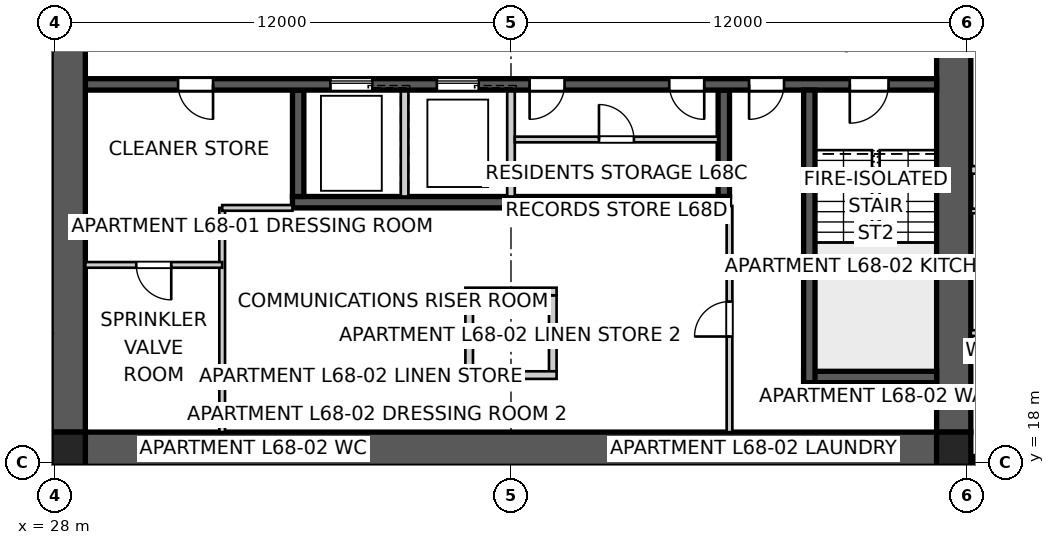
"""IFC4 building model, lengths in metres.
Left out: names, types, materials, properties, quantities, classifications, styles, units other than length and angle.
Written with IfcOpenShell. Run it as: python <this file> out.ifc"""

import sys

from ifc_helpers import new_model, si_unit, direction, frame, frame_2d, origin, origin_2d, place, context, subcontext, project, spatial, polyline, rectangle, outline, extrude, element, fill, save


model = new_model("IFC4")
c1 = context("Model", 3, precision=1e-05, world=origin(), true_north=direction((0.0, 1.0)))
c2 = subcontext(c1, "Body", "Model", "MODEL_VIEW")
j1 = project(units=[si_unit("LENGTHUNIT", "METRE"), si_unit("PLANEANGLEUNIT", "RADIAN")], contexts=[c1])
p1 = place(None, origin())
s1 = spatial("IfcSite", under=j1, at=p1, CompositionType="ELEMENT")
p2 = place(p1, origin())
s2 = spatial("IfcBuilding", under=s1, at=p2, CompositionType="ELEMENT")
p3 = place(p2, frame((0.0, 0.0, 247.2)))
s3 = spatial("IfcBuildingStorey", under=s2, at=p3, CompositionType="ELEMENT", Elevation=247.2)
p4 = place(p3, frame((51.2, 18.35, 0.0), z_axis=(0.0, 0.0, 1.0), x_axis=(-1.0, 0.0, 0.0)))
e1 = element("IfcWall", 1, at=p4, inside=s3, PredefinedType="SHEAR", context=c2, shape_type="SweptSolid", body=[
    extrude(outline(polyline([(0.0, -0.45), (22.4, -0.45), (22.4, -0.025), (22.85, -0.025), (22.85, 0.025), (22.4, 0.025), (22.4, 0.45), (0.0, 0.45), (0.0, 0.025), (-0.45, 0.025), (-0.45, -0.025), (0.0, -0.025), (0.0, -0.45)])), origin(), (0.0, 0.0, 1.0), 3.4),
])
p5 = place(p3, frame((51.65, 18.8, 0.0), z_axis=(0.0, 0.0, 1.0), x_axis=(0.0, 1.0, 0.0)))
e2 = element("IfcWall", 2, at=p5, inside=s3, PredefinedType="SHEAR", context=c2, shape_type="SweptSolid", body=[
    extrude(outline(polyline([(0.0, -0.45), (22.4, -0.45), (22.4, -0.025), (22.85, -0.025), (22.85, 0.025), (22.4, 0.025), (22.4, 0.45), (0.0, 0.45), (0.0, 0.025), (-0.45, 0.025), (-0.45, -0.025), (0.0, -0.025), (0.0, -0.45)])), origin(), (0.0, 0.0, 1.0), 3.4),
])
p6 = place(p5, frame((11.14, 0.0, 0.0)))
e3 = element("IfcOpeningElement", 3, at=p6, cuts=e2, PredefinedType="OPENING", context=c2, shape_type="SweptSolid", body=[
    extrude(rectangle(XDim=1.02, YDim=2.4, at=frame_2d((0.51, 1.2))), frame((0.0, 0.46, 0.0), z_axis=(0.0, -1.0, 0.0), x_axis=(1.0, 0.0, 0.0)), (0.0, 0.0, 1.0), 0.92),
])
p7 = place(p3, frame((28.35, 41.2, 0.0), z_axis=(0.0, 0.0, 1.0), x_axis=(0.0, -1.0, 0.0)))
e4 = element("IfcWall", 4, at=p7, inside=s3, PredefinedType="SHEAR", context=c2, shape_type="SweptSolid", body=[
    extrude(outline(polyline([(0.0, -0.45), (22.4, -0.45), (22.4, -0.025), (22.85, -0.025), (22.85, 0.025), (22.4, 0.025), (22.4, 0.45), (0.0, 0.45), (0.0, 0.025), (-0.45, 0.025), (-0.45, -0.025), (0.0, -0.025), (0.0, -0.45)])), origin(), (0.0, 0.0, 1.0), 3.4),
])
p8 = place(p7, frame((11.14, 0.0, 0.0)))
e5 = element("IfcOpeningElement", 5, at=p8, cuts=e4, PredefinedType="OPENING", context=c2, shape_type="SweptSolid", body=[
    extrude(rectangle(XDim=1.02, YDim=2.4, at=frame_2d((0.51, 1.2))), frame((0.0, 0.46, 0.0), z_axis=(0.0, -1.0, 0.0), x_axis=(1.0, 0.0, 0.0)), (0.0, 0.0, 1.0), 0.92),
])
p9 = place(p3, frame((51.2, 27.95, 0.0), z_axis=(0.0, 0.0, 1.0), x_axis=(-1.0, 0.0, 0.0)))
e6 = element("IfcWall", 6, at=p9, inside=s3, PredefinedType="SHEAR", context=c2, shape_type="SweptSolid", body=[
    extrude(rectangle(XDim=22.4, YDim=0.3, at=frame_2d((11.2, 0.0))), origin(), (0.0, 0.0, 1.0), 3.4),
])
p10 = place(p9, frame((19.04, 0.0, 0.0)))
e7 = element("IfcOpeningElement", 7, at=p10, cuts=e6, PredefinedType="OPENING", context=c2, shape_type="SweptSolid", body=[
    extrude(rectangle(XDim=0.92, YDim=2.1, at=frame_2d((0.46, 1.05))), frame((0.0, 0.16, 0.0), z_axis=(0.0, -1.0, 0.0), x_axis=(1.0, 0.0, 0.0)), (0.0, 0.0, 1.0), 0.32),
])
p11 = place(p9, frame((1.265, 0.0, 0.0)))
e8 = element("IfcOpeningElement", 8, at=p11, cuts=e6, PredefinedType="OPENING", context=c2, shape_type="SweptSolid", body=[
    extrude(rectangle(XDim=1.02, YDim=2.1, at=frame_2d((0.51, 1.05))), frame((0.0, 0.16, 0.0), z_axis=(0.0, -1.0, 0.0), x_axis=(1.0, 0.0, 0.0)), (0.0, 0.0, 1.0), 0.32),
])
p12 = place(p9, frame((4.015, 0.0, 0.0)))
e9 = element("IfcOpeningElement", 9, at=p12, cuts=e6, PredefinedType="OPENING", context=c2, shape_type="SweptSolid", body=[
    extrude(rectangle(XDim=0.92, YDim=2.1, at=frame_2d((0.46, 1.05))), frame((0.0, 0.16, 0.0), z_axis=(0.0, -1.0, 0.0), x_axis=(1.0, 0.0, 0.0)), (0.0, 0.0, 1.0), 0.32),
])
p13 = place(p9, frame((9.79, 0.0, 0.0)))
e10 = element("IfcOpeningElement", 10, at=p13, cuts=e6, PredefinedType="OPENING", context=c2, shape_type="SweptSolid", body=[
    extrude(rectangle(XDim=0.92, YDim=2.1, at=frame_2d((0.46, 1.05))), frame((0.0, 0.16, 0.0), z_axis=(0.0, -1.0, 0.0), x_axis=(1.0, 0.0, 0.0)), (0.0, 0.0, 1.0), 0.32),
])
p14 = place(p9, frame((6.115, 0.0, 0.0)))
e11 = element("IfcOpeningElement", 11, at=p14, cuts=e6, PredefinedType="OPENING", context=c2, shape_type="SweptSolid", body=[
    extrude(rectangle(XDim=0.92, YDim=2.1, at=frame_2d((0.46, 1.05))), frame((0.0, 0.16, 0.0), z_axis=(0.0, -1.0, 0.0), x_axis=(1.0, 0.0, 0.0)), (0.0, 0.0, 1.0), 0.32),
])
p15 = place(p9, frame((12.05, 0.0, 0.0)))
e12 = element("IfcOpeningElement", 12, at=p15, cuts=e6, PredefinedType="OPENING", context=c2, shape_type="SweptSolid", body=[
    extrude(rectangle(XDim=1.1, YDim=2.1, at=frame_2d((0.55, 1.05))), frame((0.0, 0.16, 0.0), z_axis=(0.0, -1.0, 0.0), x_axis=(1.0, 0.0, 0.0)), (0.0, 0.0, 1.0), 0.32),
])
p16 = place(p9, frame((14.85, 0.0, 0.0)))
e13 = element("IfcOpeningElement", 13, at=p16, cuts=e6, PredefinedType="OPENING", context=c2, shape_type="SweptSolid", body=[
    extrude(rectangle(XDim=1.1, YDim=2.1, at=frame_2d((0.55, 1.05))), frame((0.0, 0.16, 0.0), z_axis=(0.0, -1.0, 0.0), x_axis=(1.0, 0.0, 0.0)), (0.0, 0.0, 1.0), 0.32),
])
p17 = place(p3, frame((45.75, 24.85, 0.0), z_axis=(0.0, 0.0, 1.0), x_axis=(-1.0, 0.0, 0.0)))
e14 = element("IfcWall", 14, at=p17, inside=s3, PredefinedType="SHEAR", context=c2, shape_type="SweptSolid", body=[
    extrude(rectangle(XDim=11.5, YDim=0.3, at=frame_2d((5.75, 0.0))), origin(), (0.0, 0.0, 1.0), 3.4),
])
p18 = place(p3, frame((45.6, 27.8, 0.0), z_axis=(0.0, 0.0, 1.0), x_axis=(0.0, -1.0, 0.0)))
e15 = element("IfcWall", 15, at=p18, inside=s3, PredefinedType="SHEAR", context=c2, shape_type="SweptSolid", body=[
    extrude(rectangle(XDim=2.8, YDim=0.3, at=frame_2d((1.4, 0.0))), origin(), (0.0, 0.0, 1.0), 3.4),
])
for number, where, z_axis, x_axis in (
    (16, (40.0, 27.8, 0.0), (0.0, 0.0, 1.0), (0.0, -1.0, 0.0)),
    (17, (37.2, 27.8, 0.0), (0.0, 0.0, 1.0), (0.0, -1.0, 0.0)),
):
    element("IfcWall", number, at=place(p3, frame(where, z_axis=z_axis, x_axis=x_axis)), inside=s3, PredefinedType="SOLIDWALL", context=c2, shape_type="SweptSolid", body=[
        extrude(rectangle(XDim=2.8, YDim=0.2, at=frame_2d((1.4, 0.0))), origin(), (0.0, 0.0, 1.0), 3.4),
    ])
p19 = place(p3, frame((34.4, 27.8, 0.0), z_axis=(0.0, 0.0, 1.0), x_axis=(0.0, -1.0, 0.0)))
e18 = element("IfcWall", 18, at=p19, inside=s3, PredefinedType="SHEAR", context=c2, shape_type="SweptSolid", body=[
    extrude(rectangle(XDim=2.8, YDim=0.3, at=frame_2d((1.4, 0.0))), origin(), (0.0, 0.0, 1.0), 3.4),
])
p20 = place(p3, frame((47.85, 27.8, 0.0), z_axis=(0.0, 0.0, 1.0), x_axis=(0.0, -1.0, 0.0)))
e19 = element("IfcWall", 19, at=p20, inside=s3, PredefinedType="SHEAR", context=c2, shape_type="SweptSolid", body=[
    extrude(rectangle(XDim=7.7, YDim=0.3, at=frame_2d((3.85, 0.0))), origin(), (0.0, 0.0, 1.0), 3.4),
])
p21 = place(p3, frame((51.2, 20.25, 0.0), z_axis=(0.0, 0.0, 1.0), x_axis=(-1.0, 0.0, 0.0)))
e20 = element("IfcWall", 20, at=p21, inside=s3, PredefinedType="SHEAR", context=c2, shape_type="SweptSolid", body=[
    extrude(rectangle(XDim=3.5, YDim=0.3, at=frame_2d((1.75, 0.0))), origin(), (0.0, 0.0, 1.0), 3.4),
])
for number, where, z_axis, x_axis in (
    (21, (38.9, 22.4, 0.0), (0.0, 0.0, 1.0), (0.0, -1.0, 0.0)),
    (22, (41.1, 22.4, 0.0), (0.0, 0.0, 1.0), (0.0, -1.0, 0.0)),
):
    element("IfcWall", number, at=place(p3, frame(where, z_axis=z_axis, x_axis=x_axis)), inside=s3, PredefinedType="SOLIDWALL", context=c2, shape_type="SweptSolid", body=[
        extrude(rectangle(XDim=2.0, YDim=0.2, at=frame_2d((1.0, 0.0))), origin(), (0.0, 0.0, 1.0), 3.4),
    ])
for number, where, z_axis, x_axis in (
    (23, (38.8, 22.5, 0.0), (0.0, 0.0, 1.0), (1.0, 0.0, 0.0)),
    (24, (38.8, 20.3, 0.0), (0.0, 0.0, 1.0), (1.0, 0.0, 0.0)),
):
    element("IfcWall", number, at=place(p3, frame(where, z_axis=z_axis, x_axis=x_axis)), inside=s3, PredefinedType="SOLIDWALL", context=c2, shape_type="SweptSolid", body=[
        extrude(rectangle(XDim=2.4, YDim=0.2, at=frame_2d((1.2, 0.0))), origin(), (0.0, 0.0, 1.0), 3.4),
    ])
for number, where, z_axis, x_axis in (
    (25, (28.35, 18.35, 0.0), (0.0, 0.0, 1.0), (1.0, 0.0, 0.0)),
    (26, (51.65, 18.35, 0.0), (0.0, 0.0, 1.0), (1.0, 0.0, 0.0)),
):
    element("IfcColumn", number, at=place(p3, frame(where, z_axis=z_axis, x_axis=x_axis)), inside=s3, PredefinedType="COLUMN", context=c2, shape_type="SweptSolid", body=[
        extrude(rectangle(XDim=0.9, YDim=0.9, at=origin_2d()), origin(), (0.0, 0.0, 1.0), 3.4),
    ])
p22 = place(p3, frame((52.1, 25.7, 0.0), z_axis=(0.0, 0.0, 1.0), x_axis=(1.0, 0.0, 0.0)))
e27 = element("IfcWall", 27, at=p22, inside=s3, PredefinedType="PARTITIONING", context=c2, shape_type="SweptSolid", body=[
    extrude(rectangle(XDim=2.5, YDim=0.2, at=frame_2d((1.25, 0.0))), origin(), (0.0, 0.0, 1.0), 3.25),
])
p23 = place(p3, frame((22.388, 17.668, 0.0), z_axis=(0.0, 0.0, 1.0), x_axis=(0.819161528122, 0.573562891796, 0.0)))
e28 = element("IfcWall", 28, at=p23, inside=s3, PredefinedType="PARTITIONING", context=c2, shape_type="SweptSolid", body=[
    extrude(rectangle(XDim=6.681, YDim=0.25, at=frame_2d((3.341, 0.0))), origin(), (0.0, 0.0, 1.0), 3.25),
])
p24 = place(p3, frame((45.75, 18.8, 0.0), z_axis=(0.0, 0.0, 1.0), x_axis=(0.0, 1.0, 0.0)))
e29 = element("IfcWall", 29, at=p24, inside=s3, PredefinedType="SOLIDWALL", context=c2, shape_type="SweptSolid", body=[
    extrude(rectangle(XDim=5.95, YDim=0.15, at=frame_2d((2.975, 0.0))), origin(), (0.0, 0.0, 1.0), 3.25),
])
p25 = place(p24, frame((2.515, 0.0, 0.0)))
e30 = element("IfcOpeningElement", 30, at=p25, cuts=e29, PredefinedType="OPENING", context=c2, shape_type="SweptSolid", body=[
    extrude(rectangle(XDim=0.92, YDim=2.1, at=frame_2d((0.46, 1.05))), frame((0.0, 0.085, 0.0), z_axis=(0.0, -1.0, 0.0), x_axis=(1.0, 0.0, 0.0)), (0.0, 0.0, 1.0), 0.17),
])
p26 = place(p3, frame((32.4, 18.8, 0.0), z_axis=(0.0, 0.0, 1.0), x_axis=(0.0, 1.0, 0.0)))
e31 = element("IfcWall", 31, at=p26, inside=s3, PredefinedType="SOLIDWALL", context=c2, shape_type="SweptSolid", body=[
    extrude(rectangle(XDim=5.9, YDim=0.15, at=frame_2d((2.95, 0.0))), origin(), (0.0, 0.0, 1.0), 3.25),
])
p27 = place(p3, frame((32.4, 24.7, 0.0), z_axis=(0.0, 0.0, 1.0), x_axis=(1.0, 0.0, 0.0)))
e32 = element("IfcWall", 32, at=p27, inside=s3, PredefinedType="SOLIDWALL", context=c2, shape_type="SweptSolid", body=[
    extrude(rectangle(XDim=1.85, YDim=0.15, at=frame_2d((0.925, 0.0))), origin(), (0.0, 0.0, 1.0), 3.25),
])
p28 = place(p3, frame((32.4, 23.2, 0.0), z_axis=(0.0, 0.0, 1.0), x_axis=(-1.0, 0.0, 0.0)))
e33 = element("IfcWall", 33, at=p28, inside=s3, PredefinedType="SOLIDWALL", context=c2, shape_type="SweptSolid", body=[
    extrude(rectangle(XDim=3.6, YDim=0.15, at=frame_2d((1.8, 0.0))), origin(), (0.0, 0.0, 1.0), 3.25),
])
p29 = place(p28, frame((1.34, 0.0, 0.0)))
e34 = element("IfcOpeningElement", 34, at=p29, cuts=e33, PredefinedType="OPENING", context=c2, shape_type="SweptSolid", body=[
    extrude(rectangle(XDim=0.92, YDim=2.1, at=frame_2d((0.46, 1.05))), frame((0.0, 0.085, 0.0), z_axis=(0.0, -1.0, 0.0), x_axis=(1.0, 0.0, 0.0)), (0.0, 0.0, 1.0), 0.17),
])
p30 = place(p3, frame((57.0, 24.618, 0.0), z_axis=(0.0, 0.0, 1.0), x_axis=(-1.0, 0.0, 0.0)))
e35 = element("IfcWall", 35, at=p30, inside=s3, PredefinedType="PARTITIONING", context=c2, shape_type="SweptSolid", body=[
    extrude(rectangle(XDim=4.9, YDim=0.12, at=frame_2d((2.45, 0.0))), origin(), (0.0, 0.0, 1.0), 3.25),
])
p31 = place(p30, frame((1.99, 0.0, 0.0)))
e36 = element("IfcOpeningElement", 36, at=p31, cuts=e35, PredefinedType="OPENING", context=c2, shape_type="SweptSolid", body=[
    extrude(rectangle(XDim=0.92, YDim=2.34, at=frame_2d((0.46, 1.17))), frame((0.0, 0.07, 0.0), z_axis=(0.0, -1.0, 0.0), x_axis=(1.0, 0.0, 0.0)), (0.0, 0.0, 1.0), 0.14),
])
p32 = place(p3, frame((52.109, 18.194, 0.0), z_axis=(0.0, 0.0, 1.0), x_axis=(0.0, -1.0, 0.0)))
e37 = element("IfcWall", 37, at=p32, inside=s3, PredefinedType="SOLIDWALL", context=c2, shape_type="SweptSolid", body=[
    extrude(rectangle(XDim=5.194, YDim=0.15, at=frame_2d((2.597, 0.0))), origin(), (0.0, 0.0, 1.0), 3.25),
])
p33 = place(p32, frame((2.337, 0.0, 0.0)))
e38 = element("IfcOpeningElement", 38, at=p33, cuts=e37, PredefinedType="OPENING", context=c2, shape_type="SweptSolid", body=[
    extrude(rectangle(XDim=0.92, YDim=2.34, at=frame_2d((0.46, 1.17))), frame((0.0, 0.085, 0.0), z_axis=(0.0, -1.0, 0.0), x_axis=(1.0, 0.0, 0.0)), (0.0, 0.0, 1.0), 0.17),
])
p34 = place(p3, frame((57.0, 21.406, 0.0), z_axis=(0.0, 0.0, 1.0), x_axis=(-1.0, 0.0, 0.0)))
e39 = element("IfcWall", 39, at=p34, inside=s3, PredefinedType="SOLIDWALL", context=c2, shape_type="SweptSolid", body=[
    extrude(rectangle(XDim=4.9, YDim=0.15, at=frame_2d((2.45, 0.0))), origin(), (0.0, 0.0, 1.0), 3.25),
])
p35 = place(p34, frame((1.99, 0.0, 0.0)))
e40 = element("IfcOpeningElement", 40, at=p35, cuts=e39, PredefinedType="OPENING", context=c2, shape_type="SweptSolid", body=[
    extrude(rectangle(XDim=0.92, YDim=2.34, at=frame_2d((0.46, 1.17))), frame((0.0, 0.085, 0.0), z_axis=(0.0, -1.0, 0.0), x_axis=(1.0, 0.0, 0.0)), (0.0, 0.0, 1.0), 0.17),
])
p36 = place(p3, frame((40.1, 26.5, 0.0), z_axis=(0.0, 0.0, 1.0), x_axis=(1.0, 0.0, 0.0)))
e41 = element("IfcWall", 41, at=p36, inside=s3, PredefinedType="SOLIDWALL", context=c2, shape_type="SweptSolid", body=[
    extrude(rectangle(XDim=5.35, YDim=0.15, at=frame_2d((2.675, 0.0))), origin(), (0.0, 0.0, 1.0), 3.25),
])
p37 = place(p36, frame((2.215, 0.0, 0.0)))
e42 = element("IfcOpeningElement", 42, at=p37, cuts=e41, PredefinedType="OPENING", context=c2, shape_type="SweptSolid", body=[
    extrude(rectangle(XDim=0.92, YDim=2.1, at=frame_2d((0.46, 1.05))), frame((0.0, 0.085, 0.0), z_axis=(0.0, -1.0, 0.0), x_axis=(1.0, 0.0, 0.0)), (0.0, 0.0, 1.0), 0.17),
])
p38 = place(p10, origin())
e43 = element("IfcDoor", 43, at=p38, inside=s3, OperationType="SINGLE_SWING_LEFT", PredefinedType="DOOR", context=c2, shape_type="SweptSolid", body=[
    extrude(rectangle(XDim=0.92, YDim=2.1, at=frame_2d((0.46, 1.05))), frame((0.0, 0.025, 0.0), z_axis=(0.0, -1.0, 0.0), x_axis=(1.0, 0.0, 0.0)), (0.0, 0.0, 1.0), 0.05),
])
fill(e7, e43)
p39 = place(p11, origin())
e44 = element("IfcDoor", 44, at=p39, inside=s3, OperationType="SINGLE_SWING_RIGHT", PredefinedType="DOOR", context=c2, shape_type="SweptSolid", body=[
    extrude(rectangle(XDim=1.02, YDim=2.1, at=frame_2d((0.51, 1.05))), frame((0.0, 0.025, 0.0), z_axis=(0.0, -1.0, 0.0), x_axis=(1.0, 0.0, 0.0)), (0.0, 0.0, 1.0), 0.05),
])
fill(e8, e44)
p40 = place(p12, origin())
e45 = element("IfcDoor", 45, at=p40, inside=s3, OperationType="SINGLE_SWING_RIGHT", PredefinedType="DOOR", context=c2, shape_type="SweptSolid", body=[
    extrude(rectangle(XDim=0.92, YDim=2.1, at=frame_2d((0.46, 1.05))), frame((0.0, 0.025, 0.0), z_axis=(0.0, -1.0, 0.0), x_axis=(1.0, 0.0, 0.0)), (0.0, 0.0, 1.0), 0.05),
])
fill(e9, e45)
p41 = place(p29, origin())
e46 = element("IfcDoor", 46, at=p41, inside=s3, OperationType="SINGLE_SWING_LEFT", PredefinedType="DOOR", context=c2, shape_type="SweptSolid", body=[
    extrude(rectangle(XDim=0.92, YDim=2.1, at=frame_2d((0.46, 1.05))), frame((0.0, 0.025, 0.0), z_axis=(0.0, -1.0, 0.0), x_axis=(1.0, 0.0, 0.0)), (0.0, 0.0, 1.0), 0.05),
])
fill(e34, e46)
p42 = place(p25, origin())
e47 = element("IfcDoor", 47, at=p42, inside=s3, OperationType="SINGLE_SWING_LEFT", PredefinedType="DOOR", context=c2, shape_type="SweptSolid", body=[
    extrude(rectangle(XDim=0.92, YDim=2.1, at=frame_2d((0.46, 1.05))), frame((0.0, 0.025, 0.0), z_axis=(0.0, -1.0, 0.0), x_axis=(1.0, 0.0, 0.0)), (0.0, 0.0, 1.0), 0.05),
])
fill(e30, e47)
p43 = place(p13, origin())
e48 = element("IfcDoor", 48, at=p43, inside=s3, OperationType="SINGLE_SWING_RIGHT", PredefinedType="DOOR", context=c2, shape_type="SweptSolid", body=[
    extrude(rectangle(XDim=0.92, YDim=2.1, at=frame_2d((0.46, 1.05))), frame((0.0, 0.025, 0.0), z_axis=(0.0, -1.0, 0.0), x_axis=(1.0, 0.0, 0.0)), (0.0, 0.0, 1.0), 0.05),
])
fill(e10, e48)
p44 = place(p14, origin())
e49 = element("IfcDoor", 49, at=p44, inside=s3, OperationType="SINGLE_SWING_LEFT", PredefinedType="DOOR", context=c2, shape_type="SweptSolid", body=[
    extrude(rectangle(XDim=0.92, YDim=2.1, at=frame_2d((0.46, 1.05))), frame((0.0, 0.025, 0.0), z_axis=(0.0, -1.0, 0.0), x_axis=(1.0, 0.0, 0.0)), (0.0, 0.0, 1.0), 0.05),
])
fill(e11, e49)
p45 = place(p37, origin())
e50 = element("IfcDoor", 50, at=p45, inside=s3, OperationType="SINGLE_SWING_LEFT", PredefinedType="DOOR", context=c2, shape_type="SweptSolid", body=[
    extrude(rectangle(XDim=0.92, YDim=2.1, at=frame_2d((0.46, 1.05))), frame((0.0, 0.025, 0.0), z_axis=(0.0, -1.0, 0.0), x_axis=(1.0, 0.0, 0.0)), (0.0, 0.0, 1.0), 0.05),
])
fill(e42, e50)
p46 = place(p15, origin())
e51 = element("IfcDoor", 51, at=p46, inside=s3, OperationType="SLIDING_TO_LEFT", PredefinedType="DOOR", context=c2, shape_type="SweptSolid", body=[
    extrude(rectangle(XDim=1.1, YDim=2.1, at=frame_2d((0.55, 1.05))), frame((0.0, 0.025, 0.0), z_axis=(0.0, -1.0, 0.0), x_axis=(1.0, 0.0, 0.0)), (0.0, 0.0, 1.0), 0.05),
])
fill(e12, e51)
p47 = place(p16, origin())
e52 = element("IfcDoor", 52, at=p47, inside=s3, OperationType="SLIDING_TO_LEFT", PredefinedType="DOOR", context=c2, shape_type="SweptSolid", body=[
    extrude(rectangle(XDim=1.1, YDim=2.1, at=frame_2d((0.55, 1.05))), frame((0.0, 0.025, 0.0), z_axis=(0.0, -1.0, 0.0), x_axis=(1.0, 0.0, 0.0)), (0.0, 0.0, 1.0), 0.05),
])
fill(e13, e52)
save(model, sys.argv[1])
